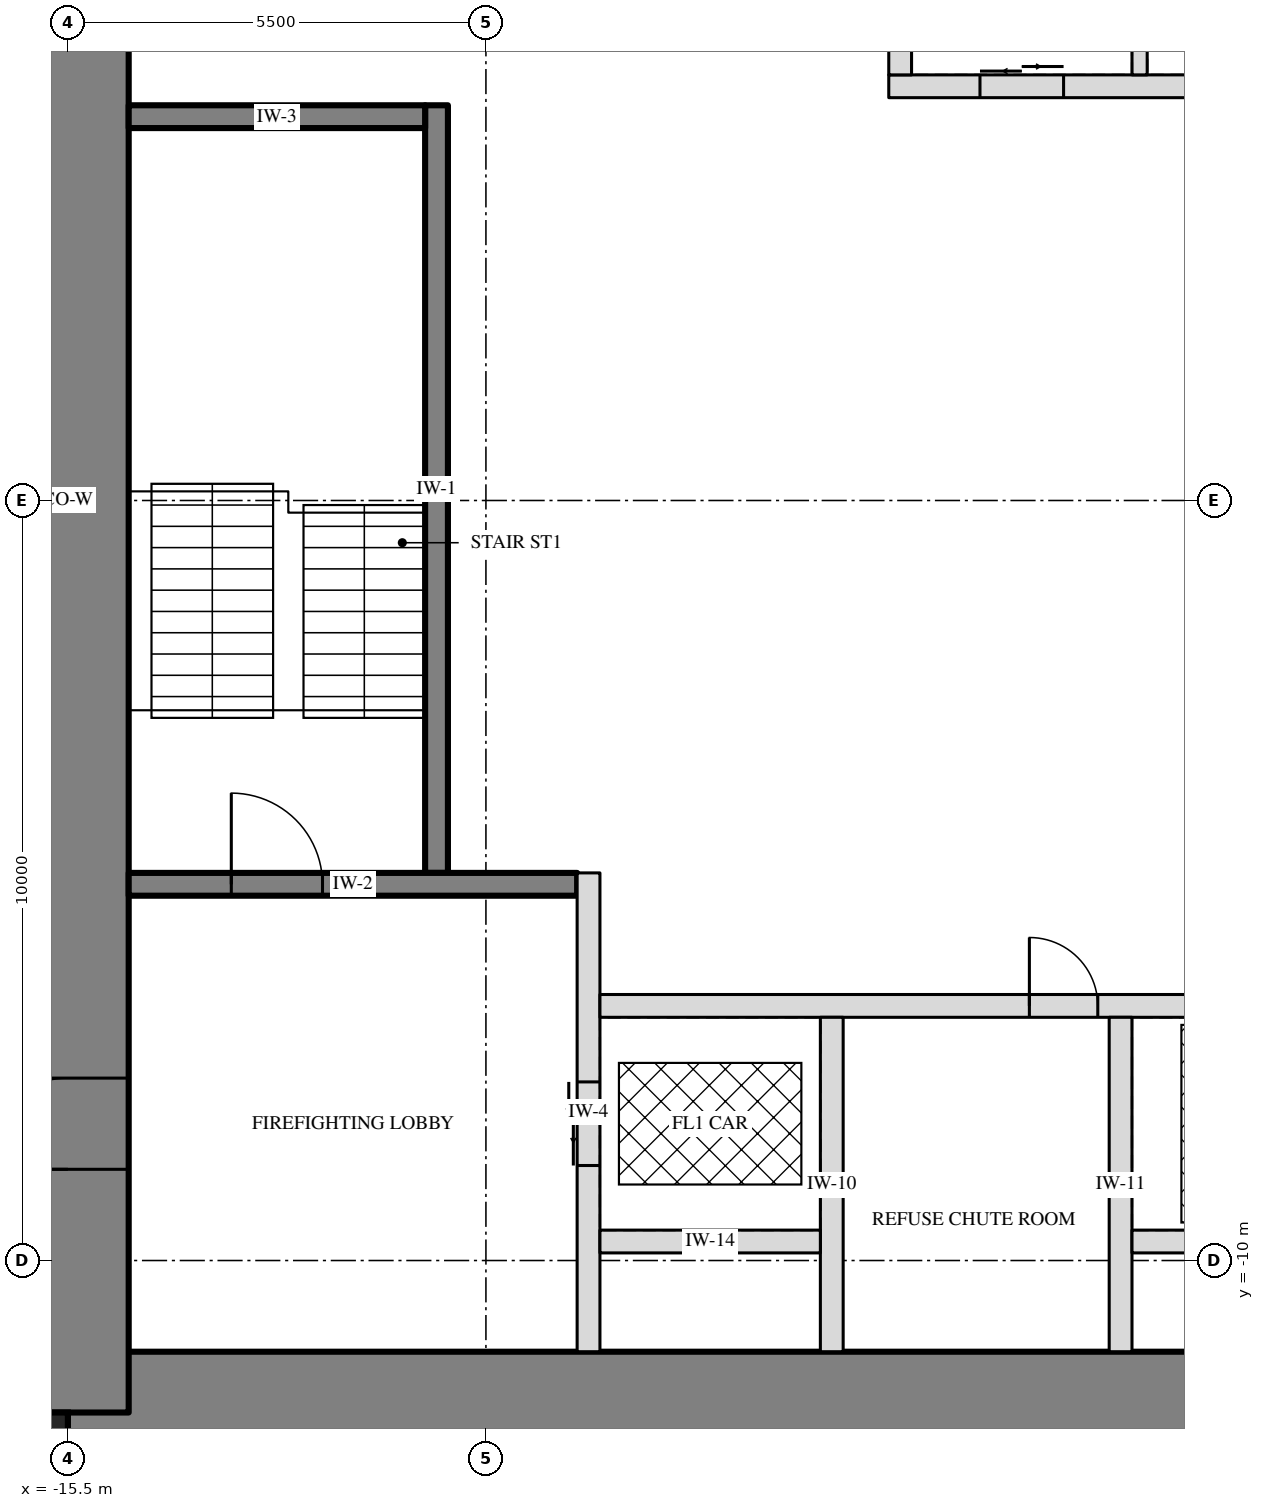
"""IFC4 building model, lengths in metres.
Left out: names, types, materials, properties, quantities, classifications, styles, units other than length and angle.
Written with IfcOpenShell. Run it as: python <this file> out.ifc"""

import sys

from ifc_helpers import new_model, si_unit, direction, frame, frame_2d, origin, origin_2d, place, context, subcontext, project, spatial, rectangle, extrude, element, fill, save


model = new_model("IFC4")
c1 = context("Model", 3, precision=1e-05, world=origin(), true_north=direction((0.0, 1.0)))
c2 = subcontext(c1, "Body", "Model", "MODEL_VIEW")
j1 = project(units=[si_unit("LENGTHUNIT", "METRE"), si_unit("PLANEANGLEUNIT", "RADIAN")], contexts=[c1])
p1 = place(None, origin())
s1 = spatial("IfcSite", under=j1, at=p1, CompositionType="ELEMENT")
p2 = place(p1, origin())
s2 = spatial("IfcBuilding", under=s1, at=p2, CompositionType="ELEMENT")
p3 = place(p2, frame((0.0, 0.0, 199.5)))
s3 = spatial("IfcBuildingStorey", under=s2, at=p3, CompositionType="ELEMENT", Elevation=199.5)
p4 = place(p3, frame((-15.5, -12.0, -0.25), z_axis=(0.0, 0.0, 1.0), x_axis=(1.0, 0.0, 0.0)))
e1 = element("IfcWall", 1, at=p4, inside=s3, PredefinedType="SHEAR", context=c2, shape_type="SweptSolid", body=[
    extrude(rectangle(XDim=31.0, YDim=1.6, at=frame_2d((15.5, 0.0))), origin(), (0.0, 0.0, 1.0), 3.75),
])
p5 = place(p3, frame((-15.5, -12.0, -0.25), z_axis=(0.0, 0.0, 1.0), x_axis=(0.0, 1.0, 0.0)))
e2 = element("IfcWall", 2, at=p5, inside=s3, PredefinedType="SHEAR", context=c2, shape_type="SweptSolid", body=[
    extrude(rectangle(XDim=24.0, YDim=1.6, at=frame_2d((12.0, 0.0))), origin(), (0.0, 0.0, 1.0), 3.75),
])
p6 = place(p5, frame((3.2, 0.0, 0.25)))
e3 = element("IfcOpeningElement", 3, at=p6, cuts=e2, PredefinedType="OPENING", context=c2, shape_type="SweptSolid", body=[
    extrude(rectangle(XDim=1.2, YDim=2.1, at=frame_2d((0.6, 1.05))), frame((0.0, 0.81, 0.0), z_axis=(0.0, -1.0, 0.0), x_axis=(1.0, 0.0, 0.0)), (0.0, 0.0, 1.0), 1.62),
])
p7 = place(p5, frame((19.3, 0.0, 0.25)))
e4 = element("IfcOpeningElement", 4, at=p7, cuts=e2, PredefinedType="OPENING", context=c2, shape_type="SweptSolid", body=[
    extrude(rectangle(XDim=1.8, YDim=2.1, at=frame_2d((0.9, 1.05))), frame((0.0, 0.81, 0.0), z_axis=(0.0, -1.0, 0.0), x_axis=(1.0, 0.0, 0.0)), (0.0, 0.0, 1.0), 1.62),
])
p8 = place(p3, frame((-15.9, -12.4, -0.25), z_axis=(0.0, 0.0, 1.0), x_axis=(1.0, 0.0, 0.0)))
e5 = element("IfcColumn", 5, at=p8, inside=s3, PredefinedType="COLUMN", context=c2, shape_type="SweptSolid", body=[
    extrude(rectangle(XDim=0.8, YDim=0.8, at=origin_2d()), origin(), (0.0, 0.0, 1.0), 3.75),
])
p9 = place(p3, frame((-10.65, -4.9, 0.0), z_axis=(0.0, 0.0, 1.0), x_axis=(0.0, 1.0, 0.0)))
e6 = element("IfcWall", 6, at=p9, inside=s3, PredefinedType="SOLIDWALL", context=c2, shape_type="SweptSolid", body=[
    extrude(rectangle(XDim=10.1, YDim=0.3, at=frame_2d((5.05, 0.0))), origin(), (0.0, 0.0, 1.0), 3.5),
])
p10 = place(p3, frame((-14.7, -5.05, 0.0), z_axis=(0.0, 0.0, 1.0), x_axis=(1.0, 0.0, 0.0)))
e7 = element("IfcWall", 7, at=p10, inside=s3, PredefinedType="SOLIDWALL", context=c2, shape_type="SweptSolid", body=[
    extrude(rectangle(XDim=5.9, YDim=0.3, at=frame_2d((2.95, 0.0))), origin(), (0.0, 0.0, 1.0), 3.5),
])
p11 = place(p10, frame((1.35, 0.0, 0.0)))
e8 = element("IfcOpeningElement", 8, at=p11, cuts=e7, PredefinedType="OPENING", context=c2, shape_type="SweptSolid", body=[
    extrude(rectangle(XDim=1.2, YDim=2.1, at=frame_2d((0.6, 1.05))), frame((0.0, 0.16, 0.0), z_axis=(0.0, -1.0, 0.0), x_axis=(1.0, 0.0, 0.0)), (0.0, 0.0, 1.0), 0.32),
])
p12 = place(p3, frame((-14.7, 5.05, 0.0), z_axis=(0.0, 0.0, 1.0), x_axis=(1.0, 0.0, 0.0)))
e9 = element("IfcWall", 9, at=p12, inside=s3, PredefinedType="SOLIDWALL", context=c2, shape_type="SweptSolid", body=[
    extrude(rectangle(XDim=3.9, YDim=0.3, at=frame_2d((1.95, 0.0))), origin(), (0.0, 0.0, 1.0), 3.5),
])
p13 = place(p3, frame((-8.65, -11.2, 0.0), z_axis=(0.0, 0.0, 1.0), x_axis=(0.0, 1.0, 0.0)))
e10 = element("IfcWall", 10, at=p13, inside=s3, PredefinedType="PARTITIONING", context=c2, shape_type="SweptSolid", body=[
    extrude(rectangle(XDim=6.3, YDim=0.3, at=frame_2d((3.15, 0.0))), origin(), (0.0, 0.0, 1.0), 3.5),
])
p14 = place(p13, frame((2.45, 0.0, 0.0)))
e11 = element("IfcOpeningElement", 11, at=p14, cuts=e10, PredefinedType="OPENING", context=c2, shape_type="SweptSolid", body=[
    extrude(rectangle(XDim=1.1, YDim=2.1, at=frame_2d((0.55, 1.05))), frame((0.0, 0.16, 0.0), z_axis=(0.0, -1.0, 0.0), x_axis=(1.0, 0.0, 0.0)), (0.0, 0.0, 1.0), 0.32),
])
p15 = place(p3, frame((-8.5, -6.65, 0.0), z_axis=(0.0, 0.0, 1.0), x_axis=(1.0, 0.0, 0.0)))
e12 = element("IfcWall", 12, at=p15, inside=s3, PredefinedType="PARTITIONING", context=c2, shape_type="SweptSolid", body=[
    extrude(rectangle(XDim=17.0, YDim=0.3, at=frame_2d((8.5, 0.0))), origin(), (0.0, 0.0, 1.0), 3.5),
])
p16 = place(p15, frame((7.8, 0.0, 0.0)))
e13 = element("IfcOpeningElement", 13, at=p16, cuts=e12, PredefinedType="OPENING", context=c2, shape_type="SweptSolid", body=[
    extrude(rectangle(XDim=1.3, YDim=2.4, at=frame_2d((0.65, 1.2))), frame((0.0, 0.16, 0.0), z_axis=(0.0, -1.0, 0.0), x_axis=(1.0, 0.0, 0.0)), (0.0, 0.0, 1.0), 0.32),
])
p17 = place(p15, frame((5.65, 0.0, 0.0)))
e14 = element("IfcOpeningElement", 14, at=p17, cuts=e12, PredefinedType="OPENING", context=c2, shape_type="SweptSolid", body=[
    extrude(rectangle(XDim=0.9, YDim=2.1, at=frame_2d((0.45, 1.05))), frame((0.0, 0.16, 0.0), z_axis=(0.0, -1.0, 0.0), x_axis=(1.0, 0.0, 0.0)), (0.0, 0.0, 1.0), 0.32),
])
p18 = place(p15, frame((10.4, 0.0, 0.0)))
e15 = element("IfcOpeningElement", 15, at=p18, cuts=e12, PredefinedType="OPENING", context=c2, shape_type="SweptSolid", body=[
    extrude(rectangle(XDim=0.9, YDim=2.1, at=frame_2d((0.45, 1.05))), frame((0.0, 0.16, 0.0), z_axis=(0.0, -1.0, 0.0), x_axis=(1.0, 0.0, 0.0)), (0.0, 0.0, 1.0), 0.32),
])
for number, where, z_axis, x_axis in (
    (16, (-5.45, -11.2, 0.0), (0.0, 0.0, 1.0), (0.0, 1.0, 0.0)),
    (17, (-1.65, -11.2, 0.0), (0.0, 0.0, 1.0), (0.0, 1.0, 0.0)),
):
    element("IfcWall", number, at=place(p3, frame(where, z_axis=z_axis, x_axis=x_axis)), inside=s3, PredefinedType="PARTITIONING", context=c2, shape_type="SweptSolid", body=[
        extrude(rectangle(XDim=4.4, YDim=0.3, at=frame_2d((2.2, 0.0))), origin(), (0.0, 0.0, 1.0), 3.5),
    ])
for number, where, z_axis, x_axis in (
    (18, (-8.5, -9.75, 0.0), (0.0, 0.0, 1.0), (1.0, 0.0, 0.0)),
    (19, (-1.5, -9.75, 0.0), (0.0, 0.0, 1.0), (1.0, 0.0, 0.0)),
):
    element("IfcWall", number, at=place(p3, frame(where, z_axis=z_axis, x_axis=x_axis)), inside=s3, PredefinedType="PARTITIONING", context=c2, shape_type="SweptSolid", body=[
        extrude(rectangle(XDim=2.9, YDim=0.3, at=frame_2d((1.45, 0.0))), origin(), (0.0, 0.0, 1.0), 3.5),
    ])
p19 = place(p3, frame((-4.7, 5.45, 0.0), z_axis=(0.0, 0.0, 1.0), x_axis=(1.0, 0.0, 0.0)))
e20 = element("IfcWall", 20, at=p19, inside=s3, PredefinedType="PARTITIONING", context=c2, shape_type="SweptSolid", body=[
    extrude(rectangle(XDim=9.7, YDim=0.3, at=frame_2d((4.85, 0.0))), origin(), (0.0, 0.0, 1.0), 3.5),
])
p20 = place(p19, frame((1.2, 0.0, 0.0)))
e21 = element("IfcOpeningElement", 21, at=p20, cuts=e20, PredefinedType="OPENING", context=c2, shape_type="SweptSolid", body=[
    extrude(rectangle(XDim=1.1, YDim=2.1, at=frame_2d((0.55, 1.05))), frame((0.0, 0.16, 0.0), z_axis=(0.0, -1.0, 0.0), x_axis=(1.0, 0.0, 0.0)), (0.0, 0.0, 1.0), 0.32),
])
p21 = place(p19, frame((4.3, 0.0, 0.0)))
e22 = element("IfcOpeningElement", 22, at=p21, cuts=e20, PredefinedType="OPENING", context=c2, shape_type="SweptSolid", body=[
    extrude(rectangle(XDim=1.1, YDim=2.1, at=frame_2d((0.55, 1.05))), frame((0.0, 0.16, 0.0), z_axis=(0.0, -1.0, 0.0), x_axis=(1.0, 0.0, 0.0)), (0.0, 0.0, 1.0), 0.32),
])
p22 = place(p19, frame((7.4, 0.0, 0.0)))
e23 = element("IfcOpeningElement", 23, at=p22, cuts=e20, PredefinedType="OPENING", context=c2, shape_type="SweptSolid", body=[
    extrude(rectangle(XDim=1.1, YDim=2.1, at=frame_2d((0.55, 1.05))), frame((0.0, 0.16, 0.0), z_axis=(0.0, -1.0, 0.0), x_axis=(1.0, 0.0, 0.0)), (0.0, 0.0, 1.0), 0.32),
])
p23 = place(p3, frame((-4.55, 5.6, 0.0), z_axis=(0.0, 0.0, 1.0), x_axis=(0.0, 1.0, 0.0)))
e24 = element("IfcWall", 24, at=p23, inside=s3, PredefinedType="PARTITIONING", context=c2, shape_type="SweptSolid", body=[
    extrude(rectangle(XDim=2.8, YDim=0.3, at=frame_2d((1.4, 0.0))), origin(), (0.0, 0.0, 1.0), 3.5),
])
p24 = place(p3, frame((-1.4, 5.6, 0.0), z_axis=(0.0, 0.0, 1.0), x_axis=(0.0, 1.0, 0.0)))
e25 = element("IfcWall", 25, at=p24, inside=s3, PredefinedType="PARTITIONING", context=c2, shape_type="SweptSolid", body=[
    extrude(rectangle(XDim=2.8, YDim=0.2, at=frame_2d((1.4, 0.0))), origin(), (0.0, 0.0, 1.0), 3.5),
])
p25 = place(p3, frame((-10.65, 3.6, 0.0), z_axis=(0.0, 0.0, 1.0), x_axis=(1.0, 0.0, 0.0)))
e26 = element("IfcWall", 26, at=p25, inside=s3, PredefinedType="PARTITIONING", context=c2, shape_type="SweptSolid", body=[
    extrude(rectangle(XDim=21.3, YDim=0.3, at=frame_2d((10.65, 0.0))), origin(), (0.0, 0.0, 1.0), 3.5),
])
p26 = place(p25, frame((10.05, 0.0, 0.0)))
e27 = element("IfcOpeningElement", 27, at=p26, cuts=e26, PredefinedType="OPENING", context=c2, shape_type="SweptSolid", body=[
    extrude(rectangle(XDim=1.2, YDim=2.1, at=frame_2d((0.6, 1.05))), frame((0.0, 0.16, 0.0), z_axis=(0.0, -1.0, 0.0), x_axis=(1.0, 0.0, 0.0)), (0.0, 0.0, 1.0), 0.32),
])
p27 = place(p25, frame((19.238, 0.0, 0.0)))
e28 = element("IfcOpeningElement", 28, at=p27, cuts=e26, PredefinedType="OPENING", context=c2, shape_type="SweptSolid", body=[
    extrude(rectangle(XDim=0.9, YDim=2.1, at=frame_2d((0.45, 1.05))), frame((0.0, 0.16, 0.0), z_axis=(0.0, -1.0, 0.0), x_axis=(1.0, 0.0, 0.0)), (0.0, 0.0, 1.0), 0.32),
])
p28 = place(p3, frame((-4.2, -6.65, 0.0), z_axis=(0.0, 0.0, 1.0), x_axis=(0.0, 1.0, 0.0)))
e29 = element("IfcWall", 29, at=p28, inside=s3, PredefinedType="PARTITIONING", context=c2, shape_type="SweptSolid", body=[
    extrude(rectangle(XDim=10.25, YDim=0.3, at=frame_2d((5.125, 0.0))), origin(), (0.0, 0.0, 1.0), 3.5),
])
p29 = place(p28, frame((0.787, 0.0, 0.0)))
e30 = element("IfcOpeningElement", 30, at=p29, cuts=e29, PredefinedType="OPENING", context=c2, shape_type="SweptSolid", body=[
    extrude(rectangle(XDim=0.9, YDim=2.1, at=frame_2d((0.45, 1.05))), frame((0.0, 0.16, 0.0), z_axis=(0.0, -1.0, 0.0), x_axis=(1.0, 0.0, 0.0)), (0.0, 0.0, 1.0), 0.32),
])
p30 = place(p28, frame((5.912, 0.0, 0.0)))
e31 = element("IfcOpeningElement", 31, at=p30, cuts=e29, PredefinedType="OPENING", context=c2, shape_type="SweptSolid", body=[
    extrude(rectangle(XDim=0.9, YDim=2.1, at=frame_2d((0.45, 1.05))), frame((0.0, 0.16, 0.0), z_axis=(0.0, -1.0, 0.0), x_axis=(1.0, 0.0, 0.0)), (0.0, 0.0, 1.0), 0.32),
])
p31 = place(p3, frame((-10.65, -4.177, 0.0), z_axis=(0.0, 0.0, 1.0), x_axis=(1.0, 0.0, 0.0)))
e32 = element("IfcWall", 32, at=p31, inside=s3, PredefinedType="PARTITIONING", context=c2, shape_type="SweptSolid", body=[
    extrude(rectangle(XDim=6.45, YDim=0.3, at=frame_2d((3.225, 0.0))), origin(), (0.0, 0.0, 1.0), 3.5),
])
p32 = place(p3, frame((-4.85, 5.3, 0.0), z_axis=(0.0, 0.0, 1.0), x_axis=(0.0, 1.0, 0.0)))
e33 = element("IfcWall", 33, at=p32, inside=s3, PredefinedType="PARTITIONING", context=c2, shape_type="SweptSolid", body=[
    extrude(rectangle(XDim=5.9, YDim=0.3, at=frame_2d((2.95, 0.0))), origin(), (0.0, 0.0, 1.0), 3.5),
])
p33 = place(p32, frame((4.15, 0.0, 0.0)))
e34 = element("IfcOpeningElement", 34, at=p33, cuts=e33, PredefinedType="OPENING", context=c2, shape_type="SweptSolid", body=[
    extrude(rectangle(XDim=0.9, YDim=2.1, at=frame_2d((0.45, 1.05))), frame((0.0, 0.16, 0.0), z_axis=(0.0, -1.0, 0.0), x_axis=(1.0, 0.0, 0.0)), (0.0, 0.0, 1.0), 0.32),
])
p34 = place(p11, origin())
e35 = element("IfcDoor", 35, at=p34, inside=s3, OperationType="SINGLE_SWING_LEFT", PredefinedType="DOOR", context=c2, shape_type="SweptSolid", body=[
    extrude(rectangle(XDim=1.2, YDim=2.1, at=frame_2d((0.6, 1.05))), frame((0.0, 0.025, 0.0), z_axis=(0.0, -1.0, 0.0), x_axis=(1.0, 0.0, 0.0)), (0.0, 0.0, 1.0), 0.05),
])
fill(e8, e35)
p35 = place(p6, origin())
e36 = element("IfcDoor", 36, at=p35, inside=s3, OperationType="SINGLE_SWING_LEFT", PredefinedType="DOOR", context=c2, shape_type="SweptSolid", body=[
    extrude(rectangle(XDim=1.2, YDim=2.1, at=frame_2d((0.6, 1.05))), frame((0.0, 0.025, 0.0), z_axis=(0.0, -1.0, 0.0), x_axis=(1.0, 0.0, 0.0)), (0.0, 0.0, 1.0), 0.05),
])
fill(e3, e36)
p36 = place(p14, origin())
e37 = element("IfcDoor", 37, at=p36, inside=s3, OperationType="DOUBLE_DOOR_SLIDING", PredefinedType="DOOR", context=c2, shape_type="SweptSolid", body=[
    extrude(rectangle(XDim=1.1, YDim=2.1, at=frame_2d((0.55, 1.05))), frame((0.0, 0.025, 0.0), z_axis=(0.0, -1.0, 0.0), x_axis=(1.0, 0.0, 0.0)), (0.0, 0.0, 1.0), 0.05),
])
fill(e11, e37)
p37 = place(p20, origin())
e38 = element("IfcDoor", 38, at=p37, inside=s3, OperationType="DOUBLE_DOOR_SLIDING", PredefinedType="DOOR", context=c2, shape_type="SweptSolid", body=[
    extrude(rectangle(XDim=1.1, YDim=2.1, at=frame_2d((0.55, 1.05))), frame((0.0, 0.025, 0.0), z_axis=(0.0, -1.0, 0.0), x_axis=(1.0, 0.0, 0.0)), (0.0, 0.0, 1.0), 0.05),
])
fill(e21, e38)
p38 = place(p17, origin())
e39 = element("IfcDoor", 39, at=p38, inside=s3, OperationType="SINGLE_SWING_LEFT", PredefinedType="DOOR", context=c2, shape_type="SweptSolid", body=[
    extrude(rectangle(XDim=0.9, YDim=2.1, at=frame_2d((0.45, 1.05))), frame((0.0, 0.025, 0.0), z_axis=(0.0, -1.0, 0.0), x_axis=(1.0, 0.0, 0.0)), (0.0, 0.0, 1.0), 0.05),
])
fill(e14, e39)
p39 = place(p29, origin())
e40 = element("IfcDoor", 40, at=p39, inside=s3, OperationType="SINGLE_SWING_LEFT", PredefinedType="DOOR", context=c2, shape_type="SweptSolid", body=[
    extrude(rectangle(XDim=0.9, YDim=2.1, at=frame_2d((0.45, 1.05))), frame((0.0, 0.025, 0.0), z_axis=(0.0, -1.0, 0.0), x_axis=(1.0, 0.0, 0.0)), (0.0, 0.0, 1.0), 0.05),
])
fill(e30, e40)
p40 = place(p30, origin())
e41 = element("IfcDoor", 41, at=p40, inside=s3, OperationType="SINGLE_SWING_LEFT", PredefinedType="DOOR", context=c2, shape_type="SweptSolid", body=[
    extrude(rectangle(XDim=0.9, YDim=2.1, at=frame_2d((0.45, 1.05))), frame((0.0, 0.025, 0.0), z_axis=(0.0, -1.0, 0.0), x_axis=(1.0, 0.0, 0.0)), (0.0, 0.0, 1.0), 0.05),
])
fill(e31, e41)
save(model, sys.argv[1])
